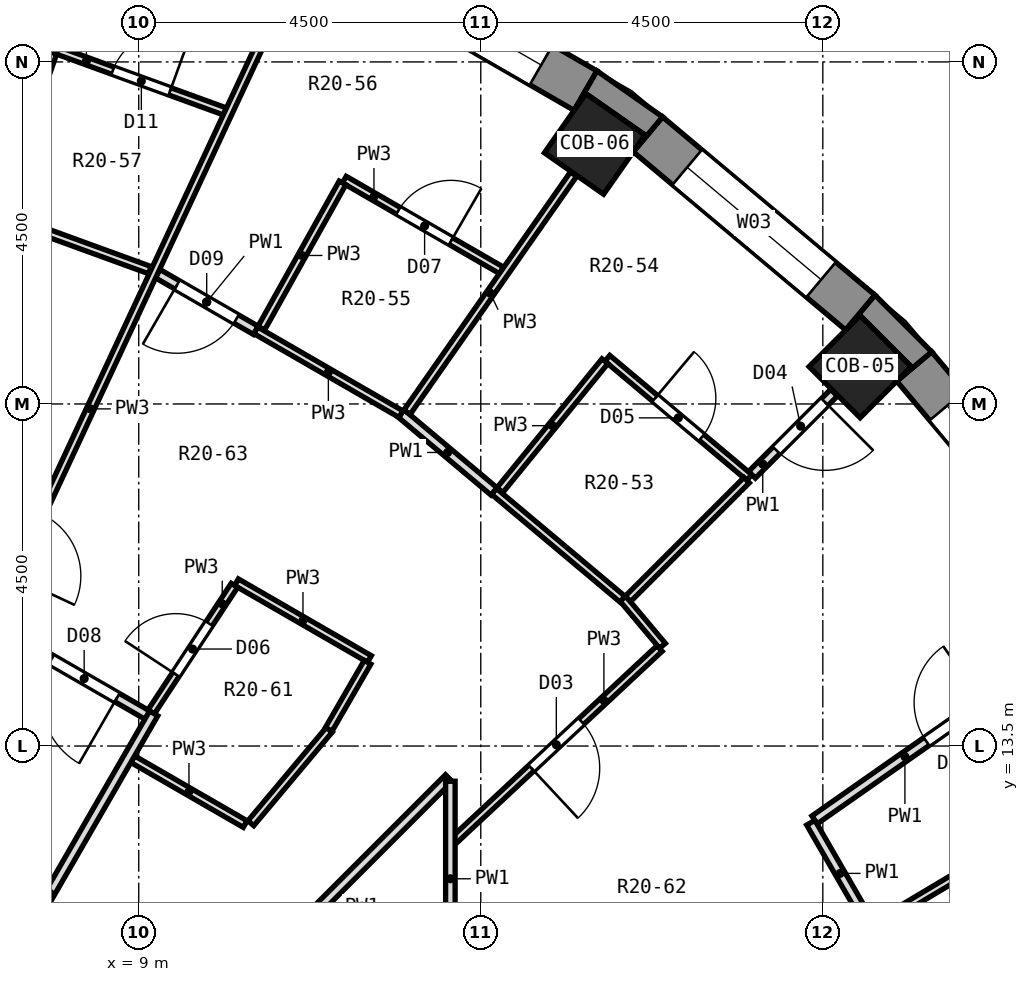
"""IFC4 building model, lengths in metres.
Left out: names, types, materials, properties, quantities, classifications, styles, units other than length and angle.
Written with IfcOpenShell. Run it as: python <this file> out.ifc"""

import sys

from ifc_helpers import new_model, si_unit, direction, frame, frame_2d, origin, origin_2d, place, context, subcontext, project, spatial, polyline, rectangle, outline, extrude, element, fill, save


model = new_model("IFC4")
c1 = context("Model", 3, precision=1e-05, world=origin(), true_north=direction((0.0, 1.0)))
c2 = subcontext(c1, "Body", "Model", "MODEL_VIEW")
j1 = project(units=[si_unit("LENGTHUNIT", "METRE"), si_unit("PLANEANGLEUNIT", "RADIAN")], contexts=[c1])
p1 = place(None, origin())
s1 = spatial("IfcSite", under=j1, at=p1, CompositionType="ELEMENT")
p2 = place(p1, origin())
s2 = spatial("IfcBuilding", under=s1, at=p2, CompositionType="ELEMENT")
p3 = place(p2, frame((0.0, 0.0, 121.6)))
s3 = spatial("IfcBuildingStorey", under=s2, at=p3, CompositionType="ELEMENT", Elevation=121.6)
for number, where, z_axis, x_axis in (
    (1, (18.491, 18.491, 0.0), (0.0, 0.0, 1.0), (0.707, 0.707, 0.0)),
    (2, (14.999, 21.421, 0.0), (0.0, 0.0, 1.0), (0.574, 0.819, 0.0)),
):
    element("IfcColumn", number, at=place(p3, frame(where, z_axis=z_axis, x_axis=x_axis)), inside=s3, PredefinedType="COLUMN", context=c2, shape_type="SweptSolid", body=[
        extrude(rectangle(XDim=0.95, YDim=0.95, at=origin_2d()), origin(), (0.0, 0.0, 1.0), 3.3),
    ])
p4 = place(p3, frame((21.547, 15.699, 0.0), z_axis=(0.0, 0.0, 1.0), x_axis=(-0.642774476932, 0.766055462616, 0.0)))
e3 = element("IfcWall", 3, at=p4, inside=s3, PredefinedType="SOLIDWALL", context=c2, shape_type="SweptSolid", body=[
    extrude(rectangle(XDim=3.648, YDim=0.6, at=frame_2d((1.824, 0.0))), origin(), (0.0, 0.0, 1.0), 2.8),
])
p5 = place(p4, frame((0.674, 0.0, 0.9)))
e4 = element("IfcOpeningElement", 4, at=p5, cuts=e3, PredefinedType="OPENING", context=c2, shape_type="SweptSolid", body=[
    extrude(rectangle(XDim=2.3, YDim=1.8, at=frame_2d((1.15, 0.9))), frame((0.0, 0.312, 0.0), z_axis=(0.0, -1.0, 0.0), x_axis=(1.0, 0.0, 0.0)), (0.0, 0.0, 1.0), 0.624),
])
p6 = place(p3, frame((18.494, 19.202, 0.0), z_axis=(0.0, 0.0, 1.0), x_axis=(-0.766055462616, 0.642774476932, 0.0)))
e5 = element("IfcWall", 5, at=p6, inside=s3, PredefinedType="SOLIDWALL", context=c2, shape_type="SweptSolid", body=[
    extrude(rectangle(XDim=3.648, YDim=0.6, at=frame_2d((1.824, 0.0))), origin(), (0.0, 0.0, 1.0), 2.8),
])
p7 = place(p6, frame((0.674, 0.0, 0.9)))
e6 = element("IfcOpeningElement", 6, at=p7, cuts=e5, PredefinedType="OPENING", context=c2, shape_type="SweptSolid", body=[
    extrude(rectangle(XDim=2.3, YDim=1.8, at=frame_2d((1.15, 0.9))), frame((0.0, 0.312, 0.0), z_axis=(0.0, -1.0, 0.0), x_axis=(1.0, 0.0, 0.0)), (0.0, 0.0, 1.0), 0.624),
])
p8 = place(p3, frame((14.878, 22.122, 0.0), z_axis=(0.0, 0.0, 1.0), x_axis=(-0.866051847062, 0.499954196102, 0.0)))
e7 = element("IfcWall", 7, at=p8, inside=s3, PredefinedType="SOLIDWALL", context=c2, shape_type="SweptSolid", body=[
    extrude(rectangle(XDim=3.648, YDim=0.6, at=frame_2d((1.824, 0.0))), origin(), (0.0, 0.0, 1.0), 2.8),
])
p9 = place(p8, frame((0.674, 0.0, 0.9)))
e8 = element("IfcOpeningElement", 8, at=p9, cuts=e7, PredefinedType="OPENING", context=c2, shape_type="SweptSolid", body=[
    extrude(rectangle(XDim=2.3, YDim=1.8, at=frame_2d((1.15, 0.9))), frame((0.0, 0.312, 0.0), z_axis=(0.0, -1.0, 0.0), x_axis=(1.0, 0.0, 0.0)), (0.0, 0.0, 1.0), 0.624),
])
p10 = place(p3, origin())
e9 = element("IfcWall", 9, at=p10, inside=s3, PredefinedType="SOLIDWALL", context=c2, shape_type="SweptSolid", body=[
    extrude(outline(polyline([(19.432, 18.686), (18.686, 19.432), (18.301, 18.972), (18.491, 19.163), (19.163, 18.491), (18.972, 18.301), (19.432, 18.686)])), origin(), (0.0, 0.0, 1.0), 2.8),
])
p11 = place(p3, origin())
e10 = element("IfcWall", 10, at=p11, inside=s3, PredefinedType="SOLIDWALL", context=c2, shape_type="SweptSolid", body=[
    extrude(outline(polyline([(15.028, 22.382), (14.728, 21.862), (14.882, 22.083), (15.661, 21.538), (15.506, 21.317), (15.892, 21.777), (15.028, 22.382)])), origin(), (0.0, 0.0, 1.0), 2.8),
])
p12 = place(p3, frame((17.842, 12.491, 0.0), z_axis=(0.0, 0.0, 1.0), x_axis=(0.499923693419, -0.866069454927, 0.0)))
e11 = element("IfcWall", 11, at=p12, inside=s3, PredefinedType="PARTITIONING", context=c2, shape_type="SweptSolid", body=[
    extrude(rectangle(XDim=1.54, YDim=0.125, at=frame_2d((0.77, 0.0))), origin(), (0.0, 0.0, 1.0), 2.8),
])
p13 = place(p3, frame((15.368, 15.44, 0.0), z_axis=(0.0, 0.0, 1.0), x_axis=(0.643079214365, -0.765799663131, 0.0)))
e12 = element("IfcWall", 12, at=p13, inside=s3, PredefinedType="PARTITIONING", context=c2, shape_type="SweptSolid", body=[
    extrude(rectangle(XDim=0.812, YDim=0.1, at=frame_2d((0.406, 0.0))), origin(), (0.0, 0.0, 1.0), 2.8),
])
p14 = place(p3, frame((13.674, 16.85, 0.0), z_axis=(0.0, 0.0, 1.0), x_axis=(0.766138779905, -0.642675166725, 0.0)))
e13 = element("IfcWall", 13, at=p14, inside=s3, PredefinedType="PARTITIONING", context=c2, shape_type="SweptSolid", body=[
    extrude(rectangle(XDim=2.205, YDim=0.1, at=frame_2d((1.103, 0.0))), origin(), (0.0, 0.0, 1.0), 2.8),
])
p15 = place(p3, frame((12.454, 17.874, 0.0), z_axis=(0.0, 0.0, 1.0), x_axis=(0.765991783553, -0.642850361693, 0.0)))
e14 = element("IfcWall", 14, at=p15, inside=s3, PredefinedType="PARTITIONING", context=c2, shape_type="SweptSolid", body=[
    extrude(rectangle(XDim=1.592, YDim=0.125, at=frame_2d((0.796, 0.0))), origin(), (0.0, 0.0, 1.0), 2.8),
])
p16 = place(p3, frame((15.165, 18.601, 0.0), z_axis=(0.0, 0.0, 1.0), x_axis=(0.765894146118, -0.642966684161, 0.0)))
e15 = element("IfcWall", 15, at=p16, inside=s3, PredefinedType="PARTITIONING", context=c2, shape_type="SweptSolid", body=[
    extrude(rectangle(XDim=2.439, YDim=0.1, at=frame_2d((1.219, 0.0))), origin(), (0.0, 0.0, 1.0), 2.8),
])
p17 = place(p16, frame((0.819, 0.0, 0.0)))
e16 = element("IfcOpeningElement", 16, at=p17, cuts=e15, PredefinedType="OPENING", context=c2, shape_type="SweptSolid", body=[
    extrude(rectangle(XDim=0.8, YDim=2.1, at=frame_2d((0.4, 1.05))), frame((0.0, 0.062, 0.0), z_axis=(0.0, -1.0, 0.0), x_axis=(1.0, 0.0, 0.0)), (0.0, 0.0, 1.0), 0.124),
])
p18 = place(p3, frame((8.921, 13.327, 0.0), z_axis=(0.0, 0.0, 1.0), x_axis=(0.866168931404, -0.499751320429, 0.0)))
e17 = element("IfcWall", 17, at=p18, inside=s3, PredefinedType="PARTITIONING", context=c2, shape_type="SweptSolid", body=[
    extrude(rectangle(XDim=1.708, YDim=0.1, at=frame_2d((0.854, 0.0))), origin(), (0.0, 0.0, 1.0), 2.8),
])
p19 = place(p3, frame((7.086, 15.077, 0.0), z_axis=(0.0, 0.0, 1.0), x_axis=(0.866192474201, -0.499710513836, 0.0)))
e18 = element("IfcWall", 18, at=p19, inside=s3, PredefinedType="PARTITIONING", context=c2, shape_type="SweptSolid", body=[
    extrude(rectangle(XDim=2.36, YDim=0.125, at=frame_2d((1.18, 0.0))), origin(), (0.0, 0.0, 1.0), 2.8),
])
p20 = place(p19, frame((0.881, 0.0, 0.0)))
e19 = element("IfcOpeningElement", 19, at=p20, cuts=e18, PredefinedType="OPENING", context=c2, shape_type="SweptSolid", body=[
    extrude(rectangle(XDim=1.0, YDim=2.1, at=frame_2d((0.5, 1.05))), frame((0.0, 0.074, 0.0), z_axis=(0.0, -1.0, 0.0), x_axis=(1.0, 0.0, 0.0)), (0.0, 0.0, 1.0), 0.149),
])
p21 = place(p3, frame((10.286, 15.655, 0.0), z_axis=(0.0, 0.0, 1.0), x_axis=(0.865980246016, -0.500078207394, 0.0)))
e20 = element("IfcWall", 20, at=p21, inside=s3, PredefinedType="PARTITIONING", context=c2, shape_type="SweptSolid", body=[
    extrude(rectangle(XDim=2.02, YDim=0.1, at=frame_2d((1.01, 0.0))), origin(), (0.0, 0.0, 1.0), 2.8),
])
p22 = place(p3, frame((10.54, 18.969, 0.0), z_axis=(0.0, 0.0, 1.0), x_axis=(0.866006764117, -0.500032283461, 0.0)))
e21 = element("IfcWall", 21, at=p22, inside=s3, PredefinedType="PARTITIONING", context=c2, shape_type="SweptSolid", body=[
    extrude(rectangle(XDim=2.205, YDim=0.1, at=frame_2d((1.103, 0.0))), origin(), (0.0, 0.0, 1.0), 2.8),
])
p23 = place(p3, frame((9.248, 19.715, 0.0), z_axis=(0.0, 0.0, 1.0), x_axis=(0.865896584481, -0.500223055231, 0.0)))
e22 = element("IfcWall", 22, at=p23, inside=s3, PredefinedType="PARTITIONING", context=c2, shape_type="SweptSolid", body=[
    extrude(rectangle(XDim=1.491, YDim=0.125, at=frame_2d((0.746, 0.0))), origin(), (0.0, 0.0, 1.0), 2.8),
])
p24 = place(p23, frame((0.296, 0.0, 0.0)))
e23 = element("IfcOpeningElement", 23, at=p24, cuts=e22, PredefinedType="OPENING", context=c2, shape_type="SweptSolid", body=[
    extrude(rectangle(XDim=0.9, YDim=2.1, at=frame_2d((0.45, 1.05))), frame((0.0, 0.074, 0.0), z_axis=(0.0, -1.0, 0.0), x_axis=(1.0, 0.0, 0.0)), (0.0, 0.0, 1.0), 0.149),
])
p25 = place(p3, frame((11.705, 20.952, 0.0), z_axis=(0.0, 0.0, 1.0), x_axis=(0.865906392454, -0.500206077039, 0.0)))
e24 = element("IfcWall", 24, at=p25, inside=s3, PredefinedType="PARTITIONING", context=c2, shape_type="SweptSolid", body=[
    extrude(rectangle(XDim=2.389, YDim=0.1, at=frame_2d((1.194, 0.0))), origin(), (0.0, 0.0, 1.0), 2.8),
])
p26 = place(p25, frame((0.82, 0.0, 0.0)))
e25 = element("IfcOpeningElement", 25, at=p26, cuts=e24, PredefinedType="OPENING", context=c2, shape_type="SweptSolid", body=[
    extrude(rectangle(XDim=0.8, YDim=2.1, at=frame_2d((0.4, 1.05))), frame((0.0, 0.062, 0.0), z_axis=(0.0, -1.0, 0.0), x_axis=(1.0, 0.0, 0.0)), (0.0, 0.0, 1.0), 0.124),
])
p27 = place(p3, frame((7.086, 20.51, 0.0), z_axis=(0.0, 0.0, 1.0), x_axis=(0.939734879809, -0.341904015289, 0.0)))
e26 = element("IfcWall", 26, at=p27, inside=s3, PredefinedType="PARTITIONING", context=c2, shape_type="SweptSolid", body=[
    extrude(rectangle(XDim=2.192, YDim=0.1, at=frame_2d((1.096, 0.0))), origin(), (0.0, 0.0, 1.0), 2.8),
])
p28 = place(p3, frame((7.889, 22.666, 0.0), z_axis=(0.0, 0.0, 1.0), x_axis=(0.939679950861, -0.342054951652, 0.0)))
e27 = element("IfcWall", 27, at=p28, inside=s3, PredefinedType="PARTITIONING", context=c2, shape_type="SweptSolid", body=[
    extrude(rectangle(XDim=2.388, YDim=0.1, at=frame_2d((1.194, 0.0))), origin(), (0.0, 0.0, 1.0), 2.8),
])
p29 = place(p28, frame((0.819, 0.0, 0.0)))
e28 = element("IfcOpeningElement", 28, at=p29, cuts=e27, PredefinedType="OPENING", context=c2, shape_type="SweptSolid", body=[
    extrude(rectangle(XDim=0.8, YDim=2.1, at=frame_2d((0.4, 1.05))), frame((0.0, 0.062, 0.0), z_axis=(0.0, -1.0, 0.0), x_axis=(1.0, 0.0, 0.0)), (0.0, 0.0, 1.0), 0.124),
])
p30 = place(p3, frame((18.691, 11.146, 0.0), z_axis=(0.0, 0.0, 1.0), x_axis=(0.858956412084, 0.512048710711, 0.0)))
e29 = element("IfcWall", 29, at=p30, inside=s3, PredefinedType="PARTITIONING", context=c2, shape_type="SweptSolid", body=[
    extrude(rectangle(XDim=2.188, YDim=0.1, at=frame_2d((1.094, 0.0))), origin(), (0.0, 0.0, 1.0), 2.8),
])
p31 = place(p3, frame((17.892, 12.529, 0.0), z_axis=(0.0, 0.0, 1.0), x_axis=(0.819258924995, 0.573423764607, 0.0)))
e30 = element("IfcWall", 30, at=p31, inside=s3, PredefinedType="PARTITIONING", context=c2, shape_type="SweptSolid", body=[
    extrude(rectangle(XDim=3.823, YDim=0.125, at=frame_2d((1.911, 0.0))), origin(), (0.0, 0.0, 1.0), 2.8),
])
p32 = place(p31, frame((1.796, 0.0, 0.0)))
e31 = element("IfcOpeningElement", 31, at=p32, cuts=e30, PredefinedType="OPENING", context=c2, shape_type="SweptSolid", body=[
    extrude(rectangle(XDim=0.9, YDim=2.1, at=frame_2d((0.45, 1.05))), frame((0.0, 0.074, 0.0), z_axis=(0.0, -1.0, 0.0), x_axis=(1.0, 0.0, 0.0)), (0.0, 0.0, 1.0), 0.149),
])
p33 = place(p3, frame((13.146, 12.259, 0.0), z_axis=(0.0, 0.0, 1.0), x_axis=(0.731186864942, 0.682177226633, 0.0)))
e32 = element("IfcWall", 32, at=p33, inside=s3, PredefinedType="PARTITIONING", context=c2, shape_type="SweptSolid", body=[
    extrude(rectangle(XDim=3.701, YDim=0.1, at=frame_2d((1.851, 0.0))), origin(), (0.0, 0.0, 1.0), 2.8),
])
p34 = place(p33, frame((1.394, 0.0, 0.0)))
e33 = element("IfcOpeningElement", 33, at=p34, cuts=e32, PredefinedType="OPENING", context=c2, shape_type="SweptSolid", body=[
    extrude(rectangle(XDim=0.9, YDim=2.1, at=frame_2d((0.45, 1.05))), frame((0.0, 0.062, 0.0), z_axis=(0.0, -1.0, 0.0), x_axis=(1.0, 0.0, 0.0)), (0.0, 0.0, 1.0), 0.124),
])
p35 = place(p3, frame((15.436, 15.436, 0.0), z_axis=(0.0, 0.0, 1.0), x_axis=(0.707106781187, 0.707106781187, 0.0)))
e34 = element("IfcWall", 34, at=p35, inside=s3, PredefinedType="PARTITIONING", context=c2, shape_type="SweptSolid", body=[
    extrude(rectangle(XDim=2.208, YDim=0.1, at=frame_2d((1.104, 0.0))), origin(), (0.0, 0.0, 1.0), 2.8),
])
p36 = place(p3, frame((9.697, 9.695, 0.0), z_axis=(0.0, 0.0, 1.0), x_axis=(0.707106781187, 0.707106781187, 0.0)))
e35 = element("IfcWall", 35, at=p36, inside=s3, PredefinedType="PARTITIONING", context=c2, shape_type="SweptSolid", body=[
    extrude(rectangle(XDim=4.784, YDim=0.125, at=frame_2d((2.392, 0.0))), origin(), (0.0, 0.0, 1.0), 2.8),
])
p37 = place(p3, frame((17.068, 17.068, 0.0), z_axis=(0.0, 0.0, 1.0), x_axis=(0.707106781187, 0.707106781187, 0.0)))
e36 = element("IfcWall", 36, at=p37, inside=s3, PredefinedType="PARTITIONING", context=c2, shape_type="SweptSolid", body=[
    extrude(rectangle(XDim=1.527, YDim=0.125, at=frame_2d((0.763, 0.0))), origin(), (0.0, 0.0, 1.0), 2.8),
])
p38 = place(p37, frame((0.455, 0.0, 0.0)))
e37 = element("IfcOpeningElement", 37, at=p38, cuts=e36, PredefinedType="OPENING", context=c2, shape_type="SweptSolid", body=[
    extrude(rectangle(XDim=0.9, YDim=2.1, at=frame_2d((0.45, 1.05))), frame((0.0, 0.074, 0.0), z_axis=(0.0, -1.0, 0.0), x_axis=(1.0, 0.0, 0.0)), (0.0, 0.0, 1.0), 0.149),
])
p39 = place(p3, frame((10.475, 12.484, 0.0), z_axis=(0.0, 0.0, 1.0), x_axis=(0.642782067074, 0.766049093889, 0.0)))
e38 = element("IfcWall", 38, at=p39, inside=s3, PredefinedType="PARTITIONING", context=c2, shape_type="SweptSolid", body=[
    extrude(rectangle(XDim=1.606, YDim=0.1, at=frame_2d((0.803, 0.0))), origin(), (0.0, 0.0, 1.0), 2.8),
])
p40 = place(p3, frame((13.751, 16.866, 0.0), z_axis=(0.0, 0.0, 1.0), x_axis=(0.631692824826, 0.775218791738, 0.0)))
e39 = element("IfcWall", 39, at=p40, inside=s3, PredefinedType="PARTITIONING", context=c2, shape_type="SweptSolid", body=[
    extrude(rectangle(XDim=2.188, YDim=0.1, at=frame_2d((1.094, 0.0))), origin(), (0.0, 0.0, 1.0), 2.8),
])
p41 = place(p3, frame((12.53, 17.892, 0.0), z_axis=(0.0, 0.0, 1.0), x_axis=(0.573235132975, 0.819390921553, 0.0)))
e40 = element("IfcWall", 40, at=p41, inside=s3, PredefinedType="PARTITIONING", context=c2, shape_type="SweptSolid", body=[
    extrude(rectangle(XDim=3.823, YDim=0.1, at=frame_2d((1.911, 0.0))), origin(), (0.0, 0.0, 1.0), 2.8),
])
p42 = place(p3, frame((9.165, 13.95, 0.0), z_axis=(0.0, 0.0, 1.0), x_axis=(0.549454342873, 0.835523742989, 0.0)))
e41 = element("IfcWall", 41, at=p42, inside=s3, PredefinedType="PARTITIONING", context=c2, shape_type="SweptSolid", body=[
    extrude(rectangle(XDim=1.991, YDim=0.1, at=frame_2d((0.996, 0.0))), origin(), (0.0, 0.0, 1.0), 2.8),
])
p43 = place(p42, frame((0.589, 0.0, 0.0)))
e42 = element("IfcOpeningElement", 42, at=p43, cuts=e41, PredefinedType="OPENING", context=c2, shape_type="SweptSolid", body=[
    extrude(rectangle(XDim=0.8, YDim=2.1, at=frame_2d((0.4, 1.05))), frame((0.0, 0.062, 0.0), z_axis=(0.0, -1.0, 0.0), x_axis=(1.0, 0.0, 0.0)), (0.0, 0.0, 1.0), 0.124),
])
p44 = place(p3, frame((11.5, 13.719, 0.0), z_axis=(0.0, 0.0, 1.0), x_axis=(0.500337452138, 0.865830488022, 0.0)))
e43 = element("IfcWall", 43, at=p44, inside=s3, PredefinedType="PARTITIONING", context=c2, shape_type="SweptSolid", body=[
    extrude(rectangle(XDim=1.019, YDim=0.1, at=frame_2d((0.51, 0.0))), origin(), (0.0, 0.0, 1.0), 2.8),
])
p45 = place(p3, frame((6.467, 9.197, 0.0), z_axis=(0.0, 0.0, 1.0), x_axis=(0.499744377638, 0.866172937132, 0.0)))
e44 = element("IfcWall", 44, at=p45, inside=s3, PredefinedType="PARTITIONING", context=c2, shape_type="SweptSolid", body=[
    extrude(rectangle(XDim=5.463, YDim=0.125, at=frame_2d((2.731, 0.0))), origin(), (0.0, 0.0, 1.0), 2.8),
])
p46 = place(p3, frame((10.614, 18.999, 0.0), z_axis=(0.0, 0.0, 1.0), x_axis=(0.487811352464, 0.872949073204, 0.0)))
e45 = element("IfcWall", 45, at=p46, inside=s3, PredefinedType="PARTITIONING", context=c2, shape_type="SweptSolid", body=[
    extrude(rectangle(XDim=2.188, YDim=0.1, at=frame_2d((1.094, 0.0))), origin(), (0.0, 0.0, 1.0), 2.8),
])
p47 = place(p3, frame((5.881, 12.611, 0.0), z_axis=(0.0, 0.0, 1.0), x_axis=(0.422604500324, 0.906314203964, 0.0)))
e46 = element("IfcWall", 46, at=p47, inside=s3, PredefinedType="PARTITIONING", context=c2, shape_type="SweptSolid", body=[
    extrude(rectangle(XDim=11.75, YDim=0.1, at=frame_2d((5.875, 0.0))), origin(), (0.0, 0.0, 1.0), 2.8),
])
p48 = place(p47, frame((3.45, 0.0, 0.0)))
e47 = element("IfcOpeningElement", 47, at=p48, cuts=e46, PredefinedType="OPENING", context=c2, shape_type="SweptSolid", body=[
    extrude(rectangle(XDim=0.9, YDim=2.1, at=frame_2d((0.45, 1.05))), frame((0.0, 0.062, 0.0), z_axis=(0.0, -1.0, 0.0), x_axis=(1.0, 0.0, 0.0)), (0.0, 0.0, 1.0), 0.124),
])
p49 = place(p3, frame((7.149, 20.541, 0.0), z_axis=(0.0, 0.0, 1.0), x_axis=(0.328718620018, 0.944427905588, 0.0)))
e48 = element("IfcWall", 48, at=p49, inside=s3, PredefinedType="PARTITIONING", context=c2, shape_type="SweptSolid", body=[
    extrude(rectangle(XDim=2.2, YDim=0.1, at=frame_2d((1.1, 0.0))), origin(), (0.0, 0.0, 1.0), 2.8),
])
p50 = place(p3, frame((13.1, 10.47, 0.0), z_axis=(0.0, 0.0, 1.0), x_axis=(0.0, 1.0, 0.0)))
e49 = element("IfcWall", 49, at=p50, inside=s3, PredefinedType="PARTITIONING", context=c2, shape_type="SweptSolid", body=[
    extrude(rectangle(XDim=2.566, YDim=0.125, at=frame_2d((1.283, 0.0))), origin(), (0.0, 0.0, 1.0), 2.8),
])
p51 = place(p5, origin())
e50 = element("IfcWindow", 50, at=p51, inside=s3, PartitioningType="SINGLE_PANEL", PredefinedType="WINDOW", context=c2, shape_type="SweptSolid", body=[
    extrude(rectangle(XDim=2.3, YDim=1.8, at=frame_2d((1.15, 0.9))), frame((0.0, 0.18, 0.0), z_axis=(0.0, -1.0, 0.0), x_axis=(1.0, 0.0, 0.0)), (0.0, 0.0, 1.0), 0.06),
])
fill(e4, e50)
p52 = place(p7, origin())
e51 = element("IfcWindow", 51, at=p52, inside=s3, PartitioningType="SINGLE_PANEL", PredefinedType="WINDOW", context=c2, shape_type="SweptSolid", body=[
    extrude(rectangle(XDim=2.3, YDim=1.8, at=frame_2d((1.15, 0.9))), frame((0.0, 0.18, 0.0), z_axis=(0.0, -1.0, 0.0), x_axis=(1.0, 0.0, 0.0)), (0.0, 0.0, 1.0), 0.06),
])
fill(e6, e51)
p53 = place(p9, origin())
e52 = element("IfcWindow", 52, at=p53, inside=s3, PartitioningType="SINGLE_PANEL", PredefinedType="WINDOW", context=c2, shape_type="SweptSolid", body=[
    extrude(rectangle(XDim=2.3, YDim=1.8, at=frame_2d((1.15, 0.9))), frame((0.0, 0.18, 0.0), z_axis=(0.0, -1.0, 0.0), x_axis=(1.0, 0.0, 0.0)), (0.0, 0.0, 1.0), 0.06),
])
fill(e8, e52)
p54 = place(p32, origin())
e53 = element("IfcDoor", 53, at=p54, inside=s3, OperationType="SINGLE_SWING_RIGHT", PredefinedType="DOOR", context=c2, shape_type="SweptSolid", body=[
    extrude(rectangle(XDim=0.9, YDim=2.1, at=frame_2d((0.45, 1.05))), frame((0.0, 0.025, 0.0), z_axis=(0.0, -1.0, 0.0), x_axis=(1.0, 0.0, 0.0)), (0.0, 0.0, 1.0), 0.05),
])
fill(e31, e53)
p55 = place(p34, frame((0.9, 0.0, 0.0), z_axis=(0.0, 0.0, 1.0), x_axis=(-1.0, 0.0, 0.0)))
e54 = element("IfcDoor", 54, at=p55, inside=s3, OperationType="SINGLE_SWING_RIGHT", PredefinedType="DOOR", context=c2, shape_type="SweptSolid", body=[
    extrude(rectangle(XDim=0.9, YDim=2.1, at=frame_2d((0.45, 1.05))), frame((0.0, 0.025, 0.0), z_axis=(0.0, -1.0, 0.0), x_axis=(1.0, 0.0, 0.0)), (0.0, 0.0, 1.0), 0.05),
])
fill(e33, e54)
p56 = place(p38, frame((0.9, 0.0, 0.0), z_axis=(0.0, 0.0, 1.0), x_axis=(-1.0, 0.0, 0.0)))
e55 = element("IfcDoor", 55, at=p56, inside=s3, OperationType="SINGLE_SWING_LEFT", PredefinedType="DOOR", context=c2, shape_type="SweptSolid", body=[
    extrude(rectangle(XDim=0.9, YDim=2.1, at=frame_2d((0.45, 1.05))), frame((0.0, 0.025, 0.0), z_axis=(0.0, -1.0, 0.0), x_axis=(1.0, 0.0, 0.0)), (0.0, 0.0, 1.0), 0.05),
])
fill(e37, e55)
p57 = place(p17, origin())
e56 = element("IfcDoor", 56, at=p57, inside=s3, OperationType="SINGLE_SWING_LEFT", PredefinedType="DOOR", context=c2, shape_type="SweptSolid", body=[
    extrude(rectangle(XDim=0.8, YDim=2.1, at=frame_2d((0.4, 1.05))), frame((0.0, 0.025, 0.0), z_axis=(0.0, -1.0, 0.0), x_axis=(1.0, 0.0, 0.0)), (0.0, 0.0, 1.0), 0.05),
])
fill(e16, e56)
p58 = place(p43, origin())
e57 = element("IfcDoor", 57, at=p58, inside=s3, OperationType="SINGLE_SWING_LEFT", PredefinedType="DOOR", context=c2, shape_type="SweptSolid", body=[
    extrude(rectangle(XDim=0.8, YDim=2.1, at=frame_2d((0.4, 1.05))), frame((0.0, 0.025, 0.0), z_axis=(0.0, -1.0, 0.0), x_axis=(1.0, 0.0, 0.0)), (0.0, 0.0, 1.0), 0.05),
])
fill(e42, e57)
p59 = place(p26, origin())
e58 = element("IfcDoor", 58, at=p59, inside=s3, OperationType="SINGLE_SWING_RIGHT", PredefinedType="DOOR", context=c2, shape_type="SweptSolid", body=[
    extrude(rectangle(XDim=0.8, YDim=2.1, at=frame_2d((0.4, 1.05))), frame((0.0, 0.025, 0.0), z_axis=(0.0, -1.0, 0.0), x_axis=(1.0, 0.0, 0.0)), (0.0, 0.0, 1.0), 0.05),
])
fill(e25, e58)
p60 = place(p20, frame((1.0, 0.0, 0.0), z_axis=(0.0, 0.0, 1.0), x_axis=(-1.0, 0.0, 0.0)))
e59 = element("IfcDoor", 59, at=p60, inside=s3, OperationType="SINGLE_SWING_LEFT", PredefinedType="DOOR", context=c2, shape_type="SweptSolid", body=[
    extrude(rectangle(XDim=1.0, YDim=2.1, at=frame_2d((0.5, 1.05))), frame((0.0, 0.025, 0.0), z_axis=(0.0, -1.0, 0.0), x_axis=(1.0, 0.0, 0.0)), (0.0, 0.0, 1.0), 0.05),
])
fill(e19, e59)
p61 = place(p24, frame((0.9, 0.0, 0.0), z_axis=(0.0, 0.0, 1.0), x_axis=(-1.0, 0.0, 0.0)))
e60 = element("IfcDoor", 60, at=p61, inside=s3, OperationType="SINGLE_SWING_RIGHT", PredefinedType="DOOR", context=c2, shape_type="SweptSolid", body=[
    extrude(rectangle(XDim=0.9, YDim=2.1, at=frame_2d((0.45, 1.05))), frame((0.0, 0.025, 0.0), z_axis=(0.0, -1.0, 0.0), x_axis=(1.0, 0.0, 0.0)), (0.0, 0.0, 1.0), 0.05),
])
fill(e23, e60)
p62 = place(p29, origin())
e61 = element("IfcDoor", 61, at=p62, inside=s3, OperationType="SINGLE_SWING_RIGHT", PredefinedType="DOOR", context=c2, shape_type="SweptSolid", body=[
    extrude(rectangle(XDim=0.8, YDim=2.1, at=frame_2d((0.4, 1.05))), frame((0.0, 0.025, 0.0), z_axis=(0.0, -1.0, 0.0), x_axis=(1.0, 0.0, 0.0)), (0.0, 0.0, 1.0), 0.05),
])
fill(e28, e61)
save(model, sys.argv[1])
